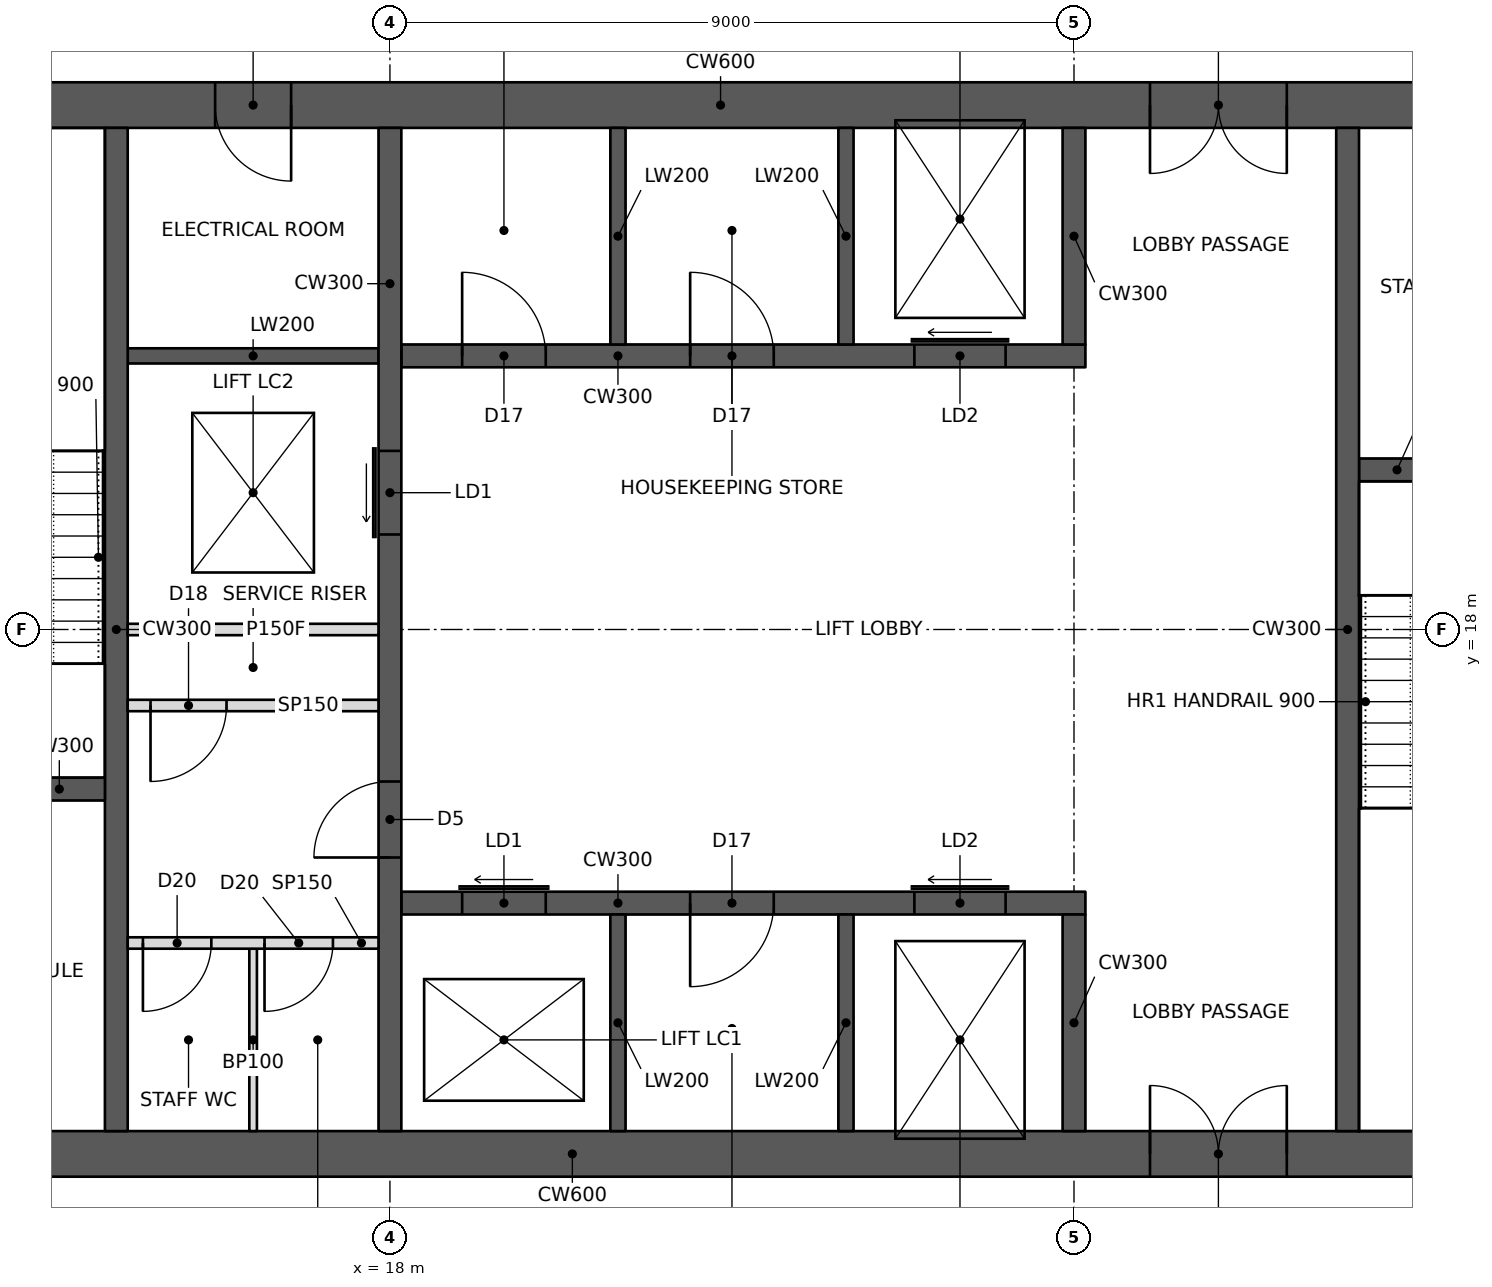
"""IFC4 building model, lengths in metres.
Left out: names, types, materials, properties, quantities, classifications, styles, units other than length and angle.
Written with IfcOpenShell. Run it as: python <this file> out.ifc"""

import sys

from ifc_helpers import new_model, si_unit, direction, frame, frame_2d, origin, place, context, subcontext, project, spatial, rectangle, extrude, element, fill, save


model = new_model("IFC4")
c1 = context("Model", 3, precision=1e-05, world=origin(), true_north=direction((0.0, 1.0)))
c2 = subcontext(c1, "Body", "Model", "MODEL_VIEW")
j1 = project(units=[si_unit("LENGTHUNIT", "METRE"), si_unit("PLANEANGLEUNIT", "RADIAN")], contexts=[c1])
p1 = place(None, origin())
s1 = spatial("IfcSite", under=j1, at=p1, CompositionType="ELEMENT")
p2 = place(p1, origin())
s2 = spatial("IfcBuilding", under=s1, at=p2, CompositionType="ELEMENT")
p3 = place(p2, frame((0.0, 0.0, 244.6)))
s3 = spatial("IfcBuildingStorey", under=s2, at=p3, CompositionType="ELEMENT", Elevation=244.6)
p4 = place(p3, frame((10.8, 11.1, 0.0), z_axis=(0.0, 0.0, 1.0), x_axis=(1.0, 0.0, 0.0)))
e1 = element("IfcWall", 1, at=p4, inside=s3, PredefinedType="SHEAR", context=c2, shape_type="SweptSolid", body=[
    extrude(rectangle(XDim=23.4, YDim=0.6, at=frame_2d((11.7, 0.0))), origin(), (0.0, 0.0, 1.0), 3.6),
])
p5 = place(p4, frame((1.0, 0.0, 0.0)))
e2 = element("IfcOpeningElement", 2, at=p5, cuts=e1, PredefinedType="OPENING", context=c2, shape_type="SweptSolid", body=[
    extrude(rectangle(XDim=1.0, YDim=2.1, at=frame_2d((0.5, 1.05))), frame((0.0, 0.31, 0.0), z_axis=(0.0, -1.0, 0.0), x_axis=(1.0, 0.0, 0.0)), (0.0, 0.0, 1.0), 0.62),
])
p6 = place(p4, frame((17.2, 0.0, 0.0)))
e3 = element("IfcOpeningElement", 3, at=p6, cuts=e1, PredefinedType="OPENING", context=c2, shape_type="SweptSolid", body=[
    extrude(rectangle(XDim=1.8, YDim=2.1, at=frame_2d((0.9, 1.05))), frame((0.0, 0.31, 0.0), z_axis=(0.0, -1.0, 0.0), x_axis=(1.0, 0.0, 0.0)), (0.0, 0.0, 1.0), 0.62),
])
p7 = place(p3, frame((10.8, 24.9, 0.0), z_axis=(0.0, 0.0, 1.0), x_axis=(1.0, 0.0, 0.0)))
e4 = element("IfcWall", 4, at=p7, inside=s3, PredefinedType="SHEAR", context=c2, shape_type="SweptSolid", body=[
    extrude(rectangle(XDim=23.4, YDim=0.6, at=frame_2d((11.7, 0.0))), origin(), (0.0, 0.0, 1.0), 3.6),
])
p8 = place(p7, frame((17.2, 0.0, 0.0)))
e5 = element("IfcOpeningElement", 5, at=p8, cuts=e4, PredefinedType="OPENING", context=c2, shape_type="SweptSolid", body=[
    extrude(rectangle(XDim=1.8, YDim=2.1, at=frame_2d((0.9, 1.05))), frame((0.0, 0.31, 0.0), z_axis=(0.0, -1.0, 0.0), x_axis=(1.0, 0.0, 0.0)), (0.0, 0.0, 1.0), 0.62),
])
p9 = place(p7, frame((21.1, 0.0, 0.0)))
e6 = element("IfcOpeningElement", 6, at=p9, cuts=e4, PredefinedType="OPENING", context=c2, shape_type="SweptSolid", body=[
    extrude(rectangle(XDim=1.0, YDim=2.1, at=frame_2d((0.5, 1.05))), frame((0.0, 0.31, 0.0), z_axis=(0.0, -1.0, 0.0), x_axis=(1.0, 0.0, 0.0)), (0.0, 0.0, 1.0), 0.62),
])
p10 = place(p7, frame((4.9, 0.0, 0.0)))
e7 = element("IfcOpeningElement", 7, at=p10, cuts=e4, PredefinedType="OPENING", context=c2, shape_type="SweptSolid", body=[
    extrude(rectangle(XDim=1.0, YDim=2.1, at=frame_2d((0.5, 1.05))), frame((0.0, 0.31, 0.0), z_axis=(0.0, -1.0, 0.0), x_axis=(1.0, 0.0, 0.0)), (0.0, 0.0, 1.0), 0.62),
])
p11 = place(p3, frame((14.4, 11.4, 0.0), z_axis=(0.0, 0.0, 1.0), x_axis=(0.0, 1.0, 0.0)))
e8 = element("IfcWall", 8, at=p11, inside=s3, PredefinedType="SHEAR", context=c2, shape_type="SweptSolid", body=[
    extrude(rectangle(XDim=13.2, YDim=0.3, at=frame_2d((6.6, 0.0))), origin(), (0.0, 0.0, 1.0), 3.6),
])
p12 = place(p3, frame((11.4, 15.9, 0.0), z_axis=(0.0, 0.0, 1.0), x_axis=(1.0, 0.0, 0.0)))
e9 = element("IfcWall", 9, at=p12, inside=s3, PredefinedType="SHEAR", context=c2, shape_type="SweptSolid", body=[
    extrude(rectangle(XDim=2.85, YDim=0.3, at=frame_2d((1.425, 0.0))), origin(), (0.0, 0.0, 1.0), 3.6),
])
p13 = place(p12, frame((0.5, 0.0, 0.0)))
e10 = element("IfcOpeningElement", 10, at=p13, cuts=e9, PredefinedType="OPENING", context=c2, shape_type="SweptSolid", body=[
    extrude(rectangle(XDim=1.0, YDim=2.1, at=frame_2d((0.5, 1.05))), frame((0.0, 0.16, 0.0), z_axis=(0.0, -1.0, 0.0), x_axis=(1.0, 0.0, 0.0)), (0.0, 0.0, 1.0), 0.32),
])
p14 = place(p3, frame((18.0, 11.4, 0.0), z_axis=(0.0, 0.0, 1.0), x_axis=(0.0, 1.0, 0.0)))
e11 = element("IfcWall", 11, at=p14, inside=s3, PredefinedType="SHEAR", context=c2, shape_type="SweptSolid", body=[
    extrude(rectangle(XDim=13.2, YDim=0.3, at=frame_2d((6.6, 0.0))), origin(), (0.0, 0.0, 1.0), 3.6),
])
p15 = place(p14, frame((3.6, 0.0, 0.0)))
e12 = element("IfcOpeningElement", 12, at=p15, cuts=e11, PredefinedType="OPENING", context=c2, shape_type="SweptSolid", body=[
    extrude(rectangle(XDim=1.0, YDim=2.1, at=frame_2d((0.5, 1.05))), frame((0.0, 0.16, 0.0), z_axis=(0.0, -1.0, 0.0), x_axis=(1.0, 0.0, 0.0)), (0.0, 0.0, 1.0), 0.32),
])
p16 = place(p14, frame((7.85, 0.0, 0.0)))
e13 = element("IfcOpeningElement", 13, at=p16, cuts=e11, PredefinedType="OPENING", context=c2, shape_type="SweptSolid", body=[
    extrude(rectangle(XDim=1.1, YDim=2.1, at=frame_2d((0.55, 1.05))), frame((0.0, 0.16, 0.0), z_axis=(0.0, -1.0, 0.0), x_axis=(1.0, 0.0, 0.0)), (0.0, 0.0, 1.0), 0.32),
])
p17 = place(p3, frame((14.55, 18.0, 0.0), z_axis=(0.0, 0.0, 1.0), x_axis=(1.0, 0.0, 0.0)))
e14 = element("IfcWall", 14, at=p17, inside=s3, PredefinedType="PARTITIONING", context=c2, shape_type="SweptSolid", body=[
    extrude(rectangle(XDim=3.3, YDim=0.15, at=frame_2d((1.65, 0.0))), origin(), (0.0, 0.0, 1.0), 3.4),
])
p18 = place(p3, frame((18.15, 14.4, 0.0), z_axis=(0.0, 0.0, 1.0), x_axis=(1.0, 0.0, 0.0)))
e15 = element("IfcWall", 15, at=p18, inside=s3, PredefinedType="SHEAR", context=c2, shape_type="SweptSolid", body=[
    extrude(rectangle(XDim=9.0, YDim=0.3, at=frame_2d((4.5, 0.0))), origin(), (0.0, 0.0, 1.0), 3.6),
])
p19 = place(p18, frame((0.8, 0.0, 0.0)))
e16 = element("IfcOpeningElement", 16, at=p19, cuts=e15, PredefinedType="OPENING", context=c2, shape_type="SweptSolid", body=[
    extrude(rectangle(XDim=1.1, YDim=2.1, at=frame_2d((0.55, 1.05))), frame((0.0, 0.16, 0.0), z_axis=(0.0, -1.0, 0.0), x_axis=(1.0, 0.0, 0.0)), (0.0, 0.0, 1.0), 0.32),
])
p20 = place(p18, frame((6.75, 0.0, 0.0)))
e17 = element("IfcOpeningElement", 17, at=p20, cuts=e15, PredefinedType="OPENING", context=c2, shape_type="SweptSolid", body=[
    extrude(rectangle(XDim=1.2, YDim=2.1, at=frame_2d((0.6, 1.05))), frame((0.0, 0.16, 0.0), z_axis=(0.0, -1.0, 0.0), x_axis=(1.0, 0.0, 0.0)), (0.0, 0.0, 1.0), 0.32),
])
p21 = place(p18, frame((3.8, 0.0, 0.0)))
e18 = element("IfcOpeningElement", 18, at=p21, cuts=e15, PredefinedType="OPENING", context=c2, shape_type="SweptSolid", body=[
    extrude(rectangle(XDim=1.1, YDim=2.1, at=frame_2d((0.55, 1.05))), frame((0.0, 0.16, 0.0), z_axis=(0.0, -1.0, 0.0), x_axis=(1.0, 0.0, 0.0)), (0.0, 0.0, 1.0), 0.32),
])
p22 = place(p3, frame((27.0, 11.4, 0.0), z_axis=(0.0, 0.0, 1.0), x_axis=(0.0, 1.0, 0.0)))
e19 = element("IfcWall", 19, at=p22, inside=s3, PredefinedType="SHEAR", context=c2, shape_type="SweptSolid", body=[
    extrude(rectangle(XDim=2.85, YDim=0.3, at=frame_2d((1.425, 0.0))), origin(), (0.0, 0.0, 1.0), 3.6),
])
for number, where, z_axis, x_axis in (
    (20, (21.0, 11.4, 0.0), (0.0, 0.0, 1.0), (0.0, 1.0, 0.0)),
    (21, (24.0, 11.4, 0.0), (0.0, 0.0, 1.0), (0.0, 1.0, 0.0)),
):
    element("IfcWall", number, at=place(p3, frame(where, z_axis=z_axis, x_axis=x_axis)), inside=s3, PredefinedType="SHEAR", context=c2, shape_type="SweptSolid", body=[
        extrude(rectangle(XDim=2.85, YDim=0.2, at=frame_2d((1.425, 0.0))), origin(), (0.0, 0.0, 1.0), 3.6),
    ])
p23 = place(p3, frame((18.15, 21.6, 0.0), z_axis=(0.0, 0.0, 1.0), x_axis=(1.0, 0.0, 0.0)))
e22 = element("IfcWall", 22, at=p23, inside=s3, PredefinedType="SHEAR", context=c2, shape_type="SweptSolid", body=[
    extrude(rectangle(XDim=9.0, YDim=0.3, at=frame_2d((4.5, 0.0))), origin(), (0.0, 0.0, 1.0), 3.6),
])
p24 = place(p23, frame((6.75, 0.0, 0.0)))
e23 = element("IfcOpeningElement", 23, at=p24, cuts=e22, PredefinedType="OPENING", context=c2, shape_type="SweptSolid", body=[
    extrude(rectangle(XDim=1.2, YDim=2.1, at=frame_2d((0.6, 1.05))), frame((0.0, 0.16, 0.0), z_axis=(0.0, -1.0, 0.0), x_axis=(1.0, 0.0, 0.0)), (0.0, 0.0, 1.0), 0.32),
])
p25 = place(p23, frame((0.8, 0.0, 0.0)))
e24 = element("IfcOpeningElement", 24, at=p25, cuts=e22, PredefinedType="OPENING", context=c2, shape_type="SweptSolid", body=[
    extrude(rectangle(XDim=1.1, YDim=2.1, at=frame_2d((0.55, 1.05))), frame((0.0, 0.16, 0.0), z_axis=(0.0, -1.0, 0.0), x_axis=(1.0, 0.0, 0.0)), (0.0, 0.0, 1.0), 0.32),
])
p26 = place(p23, frame((3.8, 0.0, 0.0)))
e25 = element("IfcOpeningElement", 25, at=p26, cuts=e22, PredefinedType="OPENING", context=c2, shape_type="SweptSolid", body=[
    extrude(rectangle(XDim=1.1, YDim=2.1, at=frame_2d((0.55, 1.05))), frame((0.0, 0.16, 0.0), z_axis=(0.0, -1.0, 0.0), x_axis=(1.0, 0.0, 0.0)), (0.0, 0.0, 1.0), 0.32),
])
p27 = place(p3, frame((27.0, 21.75, 0.0), z_axis=(0.0, 0.0, 1.0), x_axis=(0.0, 1.0, 0.0)))
e26 = element("IfcWall", 26, at=p27, inside=s3, PredefinedType="SHEAR", context=c2, shape_type="SweptSolid", body=[
    extrude(rectangle(XDim=2.85, YDim=0.3, at=frame_2d((1.425, 0.0))), origin(), (0.0, 0.0, 1.0), 3.6),
])
for number, where, z_axis, x_axis in (
    (27, (21.0, 21.75, 0.0), (0.0, 0.0, 1.0), (0.0, 1.0, 0.0)),
    (28, (24.0, 21.75, 0.0), (0.0, 0.0, 1.0), (0.0, 1.0, 0.0)),
):
    element("IfcWall", number, at=place(p3, frame(where, z_axis=z_axis, x_axis=x_axis)), inside=s3, PredefinedType="SHEAR", context=c2, shape_type="SweptSolid", body=[
        extrude(rectangle(XDim=2.85, YDim=0.2, at=frame_2d((1.425, 0.0))), origin(), (0.0, 0.0, 1.0), 3.6),
    ])
p28 = place(p3, frame((30.6, 11.4, 0.0), z_axis=(0.0, 0.0, 1.0), x_axis=(0.0, 1.0, 0.0)))
e29 = element("IfcWall", 29, at=p28, inside=s3, PredefinedType="SHEAR", context=c2, shape_type="SweptSolid", body=[
    extrude(rectangle(XDim=13.2, YDim=0.3, at=frame_2d((6.6, 0.0))), origin(), (0.0, 0.0, 1.0), 3.6),
])
p29 = place(p3, frame((30.75, 20.1, 0.0), z_axis=(0.0, 0.0, 1.0), x_axis=(1.0, 0.0, 0.0)))
e30 = element("IfcWall", 30, at=p29, inside=s3, PredefinedType="SHEAR", context=c2, shape_type="SweptSolid", body=[
    extrude(rectangle(XDim=2.85, YDim=0.3, at=frame_2d((1.425, 0.0))), origin(), (0.0, 0.0, 1.0), 3.6),
])
p30 = place(p29, frame((1.15, 0.0, 0.0)))
e31 = element("IfcOpeningElement", 31, at=p30, cuts=e30, PredefinedType="OPENING", context=c2, shape_type="SweptSolid", body=[
    extrude(rectangle(XDim=1.0, YDim=2.1, at=frame_2d((0.5, 1.05))), frame((0.0, 0.16, 0.0), z_axis=(0.0, -1.0, 0.0), x_axis=(1.0, 0.0, 0.0)), (0.0, 0.0, 1.0), 0.32),
])
p31 = place(p3, frame((14.55, 21.6, 0.0), z_axis=(0.0, 0.0, 1.0), x_axis=(1.0, 0.0, 0.0)))
e32 = element("IfcWall", 32, at=p31, inside=s3, PredefinedType="SHEAR", context=c2, shape_type="SweptSolid", body=[
    extrude(rectangle(XDim=3.3, YDim=0.2, at=frame_2d((1.65, 0.0))), origin(), (0.0, 0.0, 1.0), 3.6),
])
p32 = place(p3, frame((14.55, 17.0, 0.0), z_axis=(0.0, 0.0, 1.0), x_axis=(1.0, 0.0, 0.0)))
e33 = element("IfcWall", 33, at=p32, inside=s3, PredefinedType="PARTITIONING", context=c2, shape_type="SweptSolid", body=[
    extrude(rectangle(XDim=3.3, YDim=0.15, at=frame_2d((1.65, 0.0))), origin(), (0.0, 0.0, 1.0), 3.4),
])
p33 = place(p32, frame((0.3, 0.0, 0.0)))
e34 = element("IfcOpeningElement", 34, at=p33, cuts=e33, PredefinedType="OPENING", context=c2, shape_type="SweptSolid", body=[
    extrude(rectangle(XDim=1.0, YDim=2.1, at=frame_2d((0.5, 1.05))), frame((0.0, 0.085, 0.0), z_axis=(0.0, -1.0, 0.0), x_axis=(1.0, 0.0, 0.0)), (0.0, 0.0, 1.0), 0.17),
])
p34 = place(p3, frame((14.55, 13.875, 0.0), z_axis=(0.0, 0.0, 1.0), x_axis=(1.0, 0.0, 0.0)))
e35 = element("IfcWall", 35, at=p34, inside=s3, PredefinedType="PARTITIONING", context=c2, shape_type="SweptSolid", body=[
    extrude(rectangle(XDim=3.3, YDim=0.15, at=frame_2d((1.65, 0.0))), origin(), (0.0, 0.0, 1.0), 3.4),
])
p35 = place(p34, frame((0.2, 0.0, 0.0)))
e36 = element("IfcOpeningElement", 36, at=p35, cuts=e35, PredefinedType="OPENING", context=c2, shape_type="SweptSolid", body=[
    extrude(rectangle(XDim=0.9, YDim=2.1, at=frame_2d((0.45, 1.05))), frame((0.0, 0.085, 0.0), z_axis=(0.0, -1.0, 0.0), x_axis=(1.0, 0.0, 0.0)), (0.0, 0.0, 1.0), 0.17),
])
p36 = place(p34, frame((1.8, 0.0, 0.0)))
e37 = element("IfcOpeningElement", 37, at=p36, cuts=e35, PredefinedType="OPENING", context=c2, shape_type="SweptSolid", body=[
    extrude(rectangle(XDim=0.9, YDim=2.1, at=frame_2d((0.45, 1.05))), frame((0.0, 0.085, 0.0), z_axis=(0.0, -1.0, 0.0), x_axis=(1.0, 0.0, 0.0)), (0.0, 0.0, 1.0), 0.17),
])
p37 = place(p3, frame((16.2, 11.4, 0.0), z_axis=(0.0, 0.0, 1.0), x_axis=(0.0, 1.0, 0.0)))
e38 = element("IfcWall", 38, at=p37, inside=s3, PredefinedType="PARTITIONING", context=c2, shape_type="SweptSolid", body=[
    extrude(rectangle(XDim=2.4, YDim=0.1, at=frame_2d((1.2, 0.0))), origin(), (0.0, 0.0, 1.0), 3.4),
])
p38 = place(p33, frame((1.0, 0.0, 0.0), z_axis=(0.0, 0.0, 1.0), x_axis=(-1.0, 0.0, 0.0)))
e39 = element("IfcDoor", 39, at=p38, inside=s3, OperationType="SINGLE_SWING_RIGHT", PredefinedType="DOOR", context=c2, shape_type="SweptSolid", body=[
    extrude(rectangle(XDim=1.0, YDim=2.1, at=frame_2d((0.5, 1.05))), frame((0.0, 0.025, 0.0), z_axis=(0.0, -1.0, 0.0), x_axis=(1.0, 0.0, 0.0)), (0.0, 0.0, 1.0), 0.05),
])
fill(e34, e39)
p39 = place(p35, frame((0.9, 0.0, 0.0), z_axis=(0.0, 0.0, 1.0), x_axis=(-1.0, 0.0, 0.0)))
e40 = element("IfcDoor", 40, at=p39, inside=s3, OperationType="SINGLE_SWING_RIGHT", PredefinedType="DOOR", context=c2, shape_type="SweptSolid", body=[
    extrude(rectangle(XDim=0.9, YDim=2.1, at=frame_2d((0.45, 1.05))), frame((0.0, 0.025, 0.0), z_axis=(0.0, -1.0, 0.0), x_axis=(1.0, 0.0, 0.0)), (0.0, 0.0, 1.0), 0.05),
])
fill(e36, e40)
p40 = place(p36, frame((0.9, 0.0, 0.0), z_axis=(0.0, 0.0, 1.0), x_axis=(-1.0, 0.0, 0.0)))
e41 = element("IfcDoor", 41, at=p40, inside=s3, OperationType="SINGLE_SWING_RIGHT", PredefinedType="DOOR", context=c2, shape_type="SweptSolid", body=[
    extrude(rectangle(XDim=0.9, YDim=2.1, at=frame_2d((0.45, 1.05))), frame((0.0, 0.025, 0.0), z_axis=(0.0, -1.0, 0.0), x_axis=(1.0, 0.0, 0.0)), (0.0, 0.0, 1.0), 0.05),
])
fill(e37, e41)
p41 = place(p6, origin())
e42 = element("IfcDoor", 42, at=p41, inside=s3, OperationType="DOUBLE_DOOR_SINGLE_SWING", PredefinedType="DOOR", context=c2, shape_type="SweptSolid", body=[
    extrude(rectangle(XDim=1.8, YDim=2.1, at=frame_2d((0.9, 1.05))), frame((0.0, 0.025, 0.0), z_axis=(0.0, -1.0, 0.0), x_axis=(1.0, 0.0, 0.0)), (0.0, 0.0, 1.0), 0.05),
])
fill(e3, e42)
p42 = place(p8, frame((1.8, 0.0, 0.0), z_axis=(0.0, 0.0, 1.0), x_axis=(-1.0, 0.0, 0.0)))
e43 = element("IfcDoor", 43, at=p42, inside=s3, OperationType="DOUBLE_DOOR_SINGLE_SWING", PredefinedType="DOOR", context=c2, shape_type="SweptSolid", body=[
    extrude(rectangle(XDim=1.8, YDim=2.1, at=frame_2d((0.9, 1.05))), frame((0.0, 0.025, 0.0), z_axis=(0.0, -1.0, 0.0), x_axis=(1.0, 0.0, 0.0)), (0.0, 0.0, 1.0), 0.05),
])
fill(e5, e43)
p43 = place(p15, origin())
e44 = element("IfcDoor", 44, at=p43, inside=s3, OperationType="SINGLE_SWING_LEFT", PredefinedType="DOOR", context=c2, shape_type="SweptSolid", body=[
    extrude(rectangle(XDim=1.0, YDim=2.1, at=frame_2d((0.5, 1.05))), frame((0.0, 0.025, 0.0), z_axis=(0.0, -1.0, 0.0), x_axis=(1.0, 0.0, 0.0)), (0.0, 0.0, 1.0), 0.05),
])
fill(e12, e44)
p44 = place(p10, frame((1.0, 0.0, 0.0), z_axis=(0.0, 0.0, 1.0), x_axis=(-1.0, 0.0, 0.0)))
e45 = element("IfcDoor", 45, at=p44, inside=s3, OperationType="SINGLE_SWING_LEFT", PredefinedType="DOOR", context=c2, shape_type="SweptSolid", body=[
    extrude(rectangle(XDim=1.0, YDim=2.1, at=frame_2d((0.5, 1.05))), frame((0.0, 0.025, 0.0), z_axis=(0.0, -1.0, 0.0), x_axis=(1.0, 0.0, 0.0)), (0.0, 0.0, 1.0), 0.05),
])
fill(e7, e45)
p45 = place(p19, origin())
e46 = element("IfcDoor", 46, at=p45, inside=s3, OperationType="SLIDING_TO_LEFT", PredefinedType="DOOR", context=c2, shape_type="SweptSolid", body=[
    extrude(rectangle(XDim=1.1, YDim=2.1, at=frame_2d((0.55, 1.05))), frame((0.0, 0.025, 0.0), z_axis=(0.0, -1.0, 0.0), x_axis=(1.0, 0.0, 0.0)), (0.0, 0.0, 1.0), 0.05),
])
fill(e16, e46)
p46 = place(p16, origin())
e47 = element("IfcDoor", 47, at=p46, inside=s3, OperationType="SLIDING_TO_LEFT", PredefinedType="DOOR", context=c2, shape_type="SweptSolid", body=[
    extrude(rectangle(XDim=1.1, YDim=2.1, at=frame_2d((0.55, 1.05))), frame((0.0, 0.025, 0.0), z_axis=(0.0, -1.0, 0.0), x_axis=(1.0, 0.0, 0.0)), (0.0, 0.0, 1.0), 0.05),
])
fill(e13, e47)
p47 = place(p20, origin())
e48 = element("IfcDoor", 48, at=p47, inside=s3, OperationType="SLIDING_TO_LEFT", PredefinedType="DOOR", context=c2, shape_type="SweptSolid", body=[
    extrude(rectangle(XDim=1.2, YDim=2.1, at=frame_2d((0.6, 1.05))), frame((0.0, 0.025, 0.0), z_axis=(0.0, -1.0, 0.0), x_axis=(1.0, 0.0, 0.0)), (0.0, 0.0, 1.0), 0.05),
])
fill(e17, e48)
p48 = place(p24, origin())
e49 = element("IfcDoor", 49, at=p48, inside=s3, OperationType="SLIDING_TO_LEFT", PredefinedType="DOOR", context=c2, shape_type="SweptSolid", body=[
    extrude(rectangle(XDim=1.2, YDim=2.1, at=frame_2d((0.6, 1.05))), frame((0.0, 0.025, 0.0), z_axis=(0.0, -1.0, 0.0), x_axis=(1.0, 0.0, 0.0)), (0.0, 0.0, 1.0), 0.05),
])
fill(e23, e49)
p49 = place(p25, origin())
e50 = element("IfcDoor", 50, at=p49, inside=s3, OperationType="SINGLE_SWING_LEFT", PredefinedType="DOOR", context=c2, shape_type="SweptSolid", body=[
    extrude(rectangle(XDim=1.1, YDim=2.1, at=frame_2d((0.55, 1.05))), frame((0.0, 0.025, 0.0), z_axis=(0.0, -1.0, 0.0), x_axis=(1.0, 0.0, 0.0)), (0.0, 0.0, 1.0), 0.05),
])
fill(e24, e50)
p50 = place(p26, origin())
e51 = element("IfcDoor", 51, at=p50, inside=s3, OperationType="SINGLE_SWING_LEFT", PredefinedType="DOOR", context=c2, shape_type="SweptSolid", body=[
    extrude(rectangle(XDim=1.1, YDim=2.1, at=frame_2d((0.55, 1.05))), frame((0.0, 0.025, 0.0), z_axis=(0.0, -1.0, 0.0), x_axis=(1.0, 0.0, 0.0)), (0.0, 0.0, 1.0), 0.05),
])
fill(e25, e51)
p51 = place(p21, frame((1.1, 0.0, 0.0), z_axis=(0.0, 0.0, 1.0), x_axis=(-1.0, 0.0, 0.0)))
e52 = element("IfcDoor", 52, at=p51, inside=s3, OperationType="SINGLE_SWING_RIGHT", PredefinedType="DOOR", context=c2, shape_type="SweptSolid", body=[
    extrude(rectangle(XDim=1.1, YDim=2.1, at=frame_2d((0.55, 1.05))), frame((0.0, 0.025, 0.0), z_axis=(0.0, -1.0, 0.0), x_axis=(1.0, 0.0, 0.0)), (0.0, 0.0, 1.0), 0.05),
])
fill(e18, e52)
save(model, sys.argv[1])
